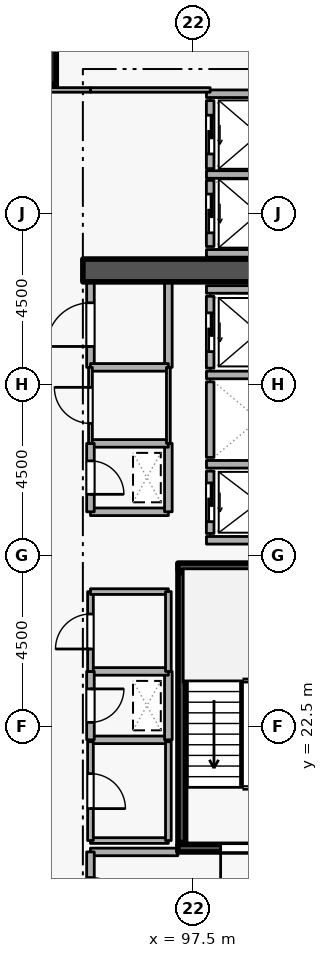
"""IFC4 building model, lengths in metres.
Left out: names, types, materials, properties, quantities, classifications, styles, units other than length and angle.
Written with IfcOpenShell. Run it as: python <this file> out.ifc"""

import sys

from ifc_helpers import new_model, si_unit, direction, frame, frame_2d, origin, origin_2d, place, context, subcontext, project, spatial, rectangle, extrude, element, fill, save


model = new_model("IFC4")
c1 = context("Model", 3, precision=1e-05, world=origin(), true_north=direction((0.0, 1.0)))
c2 = subcontext(c1, "Body", "Model", "MODEL_VIEW")
j1 = project(units=[si_unit("LENGTHUNIT", "METRE"), si_unit("PLANEANGLEUNIT", "RADIAN")], contexts=[c1])
p1 = place(None, origin())
s1 = spatial("IfcSite", under=j1, at=p1, CompositionType="ELEMENT")
p2 = place(p1, origin())
s2 = spatial("IfcBuilding", under=s1, at=p2, CompositionType="ELEMENT")
p3 = place(p2, frame((0.0, 0.0, 105.3)))
s3 = spatial("IfcBuildingStorey", under=s2, at=p3, CompositionType="ELEMENT", Elevation=105.3)
p4 = place(p3, frame((94.6, 34.5, 0.0), z_axis=(0.0, 0.0, 1.0), x_axis=(1.0, 0.0, 0.0)))
e1 = element("IfcWall", 1, at=p4, inside=s3, PredefinedType="SHEAR", context=c2, shape_type="SweptSolid", body=[
    extrude(rectangle(XDim=5.7, YDim=0.6, at=frame_2d((2.85, 0.0))), origin(), (0.0, 0.0, 1.0), 3.6),
])
p5 = place(p3, frame((93.3, 40.0, 0.0), z_axis=(0.0, 0.0, 1.0), x_axis=(1.0, 0.0, 0.0)))
e2 = element("IfcColumn", 2, at=p5, inside=s3, PredefinedType="COLUMN", context=c2, shape_type="SweptSolid", body=[
    extrude(rectangle(XDim=1.2, YDim=1.2, at=origin_2d()), origin(), (0.0, 0.0, 1.0), 3.6),
])
p6 = place(p3, frame((97.95, 29.22, 0.0), z_axis=(0.0, 0.0, 1.0), x_axis=(0.0, -1.0, 0.0)))
e3 = element("IfcWall", 3, at=p6, inside=s3, PredefinedType="STANDARD", context=c2, shape_type="SweptSolid", body=[
    extrude(rectangle(XDim=1.64, YDim=0.2, at=frame_2d((0.82, 0.0))), origin(), (0.0, 0.0, 1.0), 3.34),
])
p7 = place(p6, frame((0.31, 0.0, 0.0)))
e4 = element("IfcOpeningElement", 4, at=p7, cuts=e3, PredefinedType="OPENING", context=c2, shape_type="SweptSolid", body=[
    extrude(rectangle(XDim=1.02, YDim=2.06, at=frame_2d((0.51, 1.03))), frame((0.0, 0.11, 0.0), z_axis=(0.0, -1.0, 0.0), x_axis=(1.0, 0.0, 0.0)), (0.0, 0.0, 1.0), 0.22),
])
p8 = place(p3, frame((97.95, 31.57, 0.0), z_axis=(0.0, 0.0, 1.0), x_axis=(0.0, -1.0, 0.0)))
e5 = element("IfcWall", 5, at=p8, inside=s3, PredefinedType="STANDARD", context=c2, shape_type="SweptSolid", body=[
    extrude(rectangle(XDim=1.99, YDim=0.2, at=frame_2d((0.995, 0.0))), origin(), (0.0, 0.0, 1.0), 3.34),
])
p9 = place(p3, frame((97.95, 33.82, 0.0), z_axis=(0.0, 0.0, 1.0), x_axis=(0.0, -1.0, 0.0)))
e6 = element("IfcWall", 6, at=p9, inside=s3, PredefinedType="STANDARD", context=c2, shape_type="SweptSolid", body=[
    extrude(rectangle(XDim=1.89, YDim=0.2, at=frame_2d((0.945, 0.0))), origin(), (0.0, 0.0, 1.0), 3.34),
])
p10 = place(p9, frame((0.435, 0.0, 0.0)))
e7 = element("IfcOpeningElement", 7, at=p10, cuts=e6, PredefinedType="OPENING", context=c2, shape_type="SweptSolid", body=[
    extrude(rectangle(XDim=1.02, YDim=2.06, at=frame_2d((0.51, 1.03))), frame((0.0, 0.11, 0.0), z_axis=(0.0, -1.0, 0.0), x_axis=(1.0, 0.0, 0.0)), (0.0, 0.0, 1.0), 0.22),
])
p11 = place(p3, frame((97.95, 36.87, 0.0), z_axis=(0.0, 0.0, 1.0), x_axis=(0.0, -1.0, 0.0)))
e8 = element("IfcWall", 8, at=p11, inside=s3, PredefinedType="STANDARD", context=c2, shape_type="SweptSolid", body=[
    extrude(rectangle(XDim=1.74, YDim=0.2, at=frame_2d((0.87, 0.0))), origin(), (0.0, 0.0, 1.0), 3.34),
])
p12 = place(p11, frame((0.36, 0.0, 0.0)))
e9 = element("IfcOpeningElement", 9, at=p12, cuts=e8, PredefinedType="OPENING", context=c2, shape_type="SweptSolid", body=[
    extrude(rectangle(XDim=1.02, YDim=2.06, at=frame_2d((0.51, 1.03))), frame((0.0, 0.11, 0.0), z_axis=(0.0, -1.0, 0.0), x_axis=(1.0, 0.0, 0.0)), (0.0, 0.0, 1.0), 0.22),
])
p13 = place(p3, frame((97.95, 38.97, 0.0), z_axis=(0.0, 0.0, 1.0), x_axis=(0.0, -1.0, 0.0)))
e10 = element("IfcWall", 10, at=p13, inside=s3, PredefinedType="STANDARD", context=c2, shape_type="SweptSolid", body=[
    extrude(rectangle(XDim=1.79, YDim=0.2, at=frame_2d((0.895, 0.0))), origin(), (0.0, 0.0, 1.0), 3.34),
])
p14 = place(p13, frame((0.385, 0.0, 0.0)))
e11 = element("IfcOpeningElement", 11, at=p14, cuts=e10, PredefinedType="OPENING", context=c2, shape_type="SweptSolid", body=[
    extrude(rectangle(XDim=1.02, YDim=2.06, at=frame_2d((0.51, 1.03))), frame((0.0, 0.11, 0.0), z_axis=(0.0, -1.0, 0.0), x_axis=(1.0, 0.0, 0.0)), (0.0, 0.0, 1.0), 0.22),
])
for number, where, z_axis, x_axis in (
    (12, (97.852, 29.4, 0.0), (0.0, 0.0, 1.0), (1.0, 0.0, 0.0)),
    (13, (97.852, 27.4, 0.0), (0.0, 0.0, 1.0), (1.0, 0.0, 0.0)),
    (14, (97.852, 31.75, 0.0), (0.0, 0.0, 1.0), (1.0, 0.0, 0.0)),
    (15, (97.852, 34.0, 0.0), (0.0, 0.0, 1.0), (1.0, 0.0, 0.0)),
):
    element("IfcWall", number, at=place(p3, frame(where, z_axis=z_axis, x_axis=x_axis)), inside=s3, PredefinedType="STANDARD", context=c2, shape_type="SweptSolid", body=[
        extrude(rectangle(XDim=2.436, YDim=0.2, at=frame_2d((1.218, 0.0))), origin(), (0.0, 0.0, 1.0), 3.34),
    ])
for number, where, z_axis, x_axis in (
    (16, (97.852, 37.025, 0.0), (0.0, 0.0, 1.0), (1.0, 0.0, 0.0)),
    (17, (97.852, 34.95, 0.0), (0.0, 0.0, 1.0), (1.0, 0.0, 0.0)),
):
    element("IfcWall", number, at=place(p3, frame(where, z_axis=z_axis, x_axis=x_axis)), inside=s3, PredefinedType="STANDARD", context=c2, shape_type="SweptSolid", body=[
        extrude(rectangle(XDim=2.746, YDim=0.2, at=frame_2d((1.373, 0.0))), origin(), (0.0, 0.0, 1.0), 3.34),
    ])
p15 = place(p3, frame((97.852, 39.15, 0.0), z_axis=(0.0, 0.0, 1.0), x_axis=(1.0, 0.0, 0.0)))
e18 = element("IfcWall", 18, at=p15, inside=s3, PredefinedType="STANDARD", context=c2, shape_type="SweptSolid", body=[
    extrude(rectangle(XDim=2.636, YDim=0.2, at=frame_2d((1.318, 0.0))), origin(), (0.0, 0.0, 1.0), 3.34),
])
p16 = place(p3, frame((100.45, 19.3, 0.0), z_axis=(0.0, 0.0, 1.0), x_axis=(-1.0, 0.0, 0.0)))
e19 = element("IfcWall", 19, at=p16, inside=s3, PredefinedType="SHEAR", context=c2, shape_type="SweptSolid", body=[
    extrude(rectangle(XDim=3.35, YDim=0.2, at=frame_2d((1.675, 0.0))), origin(), (0.0, 0.0, 1.0), 3.6),
])
p17 = place(p16, frame((1.125, 0.0, 0.0)))
e20 = element("IfcOpeningElement", 20, at=p17, cuts=e19, PredefinedType="OPENING", context=c2, shape_type="SweptSolid", body=[
    extrude(rectangle(XDim=1.1, YDim=2.1, at=frame_2d((0.55, 1.05))), frame((0.0, 0.11, 0.0), z_axis=(0.0, -1.0, 0.0), x_axis=(1.0, 0.0, 0.0)), (0.0, 0.0, 1.0), 0.22),
])
p18 = place(p3, frame((97.1, 26.7, 0.0), z_axis=(0.0, 0.0, 1.0), x_axis=(1.0, 0.0, 0.0)))
e21 = element("IfcWall", 21, at=p18, inside=s3, PredefinedType="SHEAR", context=c2, shape_type="SweptSolid", body=[
    extrude(rectangle(XDim=3.35, YDim=0.2, at=frame_2d((1.675, 0.0))), origin(), (0.0, 0.0, 1.0), 3.6),
])
p19 = place(p3, frame((97.203, 26.55, 0.0), z_axis=(0.0, 0.0, 1.0), x_axis=(0.0, -1.0, 0.0)))
e22 = element("IfcWall", 22, at=p19, inside=s3, PredefinedType="SHEAR", context=c2, shape_type="SweptSolid", body=[
    extrude(rectangle(XDim=7.1, YDim=0.2, at=frame_2d((3.55, 0.0))), origin(), (0.0, 0.0, 1.0), 3.6),
])
p20 = place(p3, frame((97.1, 19.2, 0.0), z_axis=(0.0, 0.0, 1.0), x_axis=(-1.0, 0.0, 0.0)))
e23 = element("IfcWall", 23, at=p20, inside=s3, PredefinedType="STANDARD", context=c2, shape_type="SweptSolid", body=[
    extrude(rectangle(XDim=2.3, YDim=0.2, at=frame_2d((1.15, 0.0))), origin(), (0.0, 0.0, 1.0), 2.545),
])
p21 = place(p3, frame((94.8, 19.2, 0.0), z_axis=(0.0, 0.0, 1.0), x_axis=(0.0, -1.0, 0.0)))
e24 = element("IfcWall", 24, at=p21, inside=s3, PredefinedType="STANDARD", context=c2, shape_type="SweptSolid", body=[
    extrude(rectangle(XDim=2.5, YDim=0.2, at=frame_2d((1.25, 0.0))), origin(), (0.0, 0.0, 1.0), 3.34),
])
p22 = place(p21, frame((0.675, 0.0, 0.0)))
e25 = element("IfcOpeningElement", 25, at=p22, cuts=e24, PredefinedType="OPENING", context=c2, shape_type="SweptSolid", body=[
    extrude(rectangle(XDim=1.15, YDim=2.1, at=frame_2d((0.575, 1.05))), frame((0.0, 0.11, 0.0), z_axis=(0.0, -1.0, 0.0), x_axis=(1.0, 0.0, 0.0)), (0.0, 0.0, 1.0), 0.22),
])
p23 = place(p3, frame((94.8, 28.15, 0.0), z_axis=(0.0, 0.0, 1.0), x_axis=(1.0, 0.0, 0.0)))
e26 = element("IfcWall", 26, at=p23, inside=s3, PredefinedType="STANDARD", context=c2, shape_type="SweptSolid", body=[
    extrude(rectangle(XDim=2.05, YDim=0.2, at=frame_2d((1.025, 0.0))), origin(), (0.0, 0.0, 1.0), 3.34),
])
p24 = place(p3, frame((96.85, 28.15, 0.0), z_axis=(0.0, 0.0, 1.0), x_axis=(0.0, 1.0, 0.0)))
e27 = element("IfcWall", 27, at=p24, inside=s3, PredefinedType="STANDARD", context=c2, shape_type="SweptSolid", body=[
    extrude(rectangle(XDim=1.8, YDim=0.2, at=frame_2d((0.9, 0.0))), origin(), (0.0, 0.0, 1.0), 3.34),
])
p25 = place(p3, frame((96.85, 29.95, 0.0), z_axis=(0.0, 0.0, 1.0), x_axis=(-1.0, 0.0, 0.0)))
e28 = element("IfcWall", 28, at=p25, inside=s3, PredefinedType="STANDARD", context=c2, shape_type="SweptSolid", body=[
    extrude(rectangle(XDim=2.05, YDim=0.2, at=frame_2d((1.025, 0.0))), origin(), (0.0, 0.0, 1.0), 3.34),
])
p26 = place(p3, frame((94.8, 29.95, 0.0), z_axis=(0.0, 0.0, 1.0), x_axis=(0.0, -1.0, 0.0)))
e29 = element("IfcWall", 29, at=p26, inside=s3, PredefinedType="STANDARD", context=c2, shape_type="SweptSolid", body=[
    extrude(rectangle(XDim=1.8, YDim=0.2, at=frame_2d((0.9, 0.0))), origin(), (0.0, 0.0, 1.0), 3.34),
])
p27 = place(p26, frame((0.46, 0.0, 0.0)))
e30 = element("IfcOpeningElement", 30, at=p27, cuts=e29, PredefinedType="OPENING", context=c2, shape_type="SweptSolid", body=[
    extrude(rectangle(XDim=0.88, YDim=2.04, at=frame_2d((0.44, 1.02))), frame((0.0, 0.11, 0.0), z_axis=(0.0, -1.0, 0.0), x_axis=(1.0, 0.0, 0.0)), (0.0, 0.0, 1.0), 0.22),
])
p28 = place(p3, frame((94.8, 22.15, 0.0), z_axis=(0.0, 0.0, 1.0), x_axis=(1.0, 0.0, 0.0)))
e31 = element("IfcWall", 31, at=p28, inside=s3, PredefinedType="STANDARD", context=c2, shape_type="SweptSolid", body=[
    extrude(rectangle(XDim=2.05, YDim=0.2, at=frame_2d((1.025, 0.0))), origin(), (0.0, 0.0, 1.0), 3.34),
])
p29 = place(p3, frame((96.85, 22.15, 0.0), z_axis=(0.0, 0.0, 1.0), x_axis=(0.0, 1.0, 0.0)))
e32 = element("IfcWall", 32, at=p29, inside=s3, PredefinedType="STANDARD", context=c2, shape_type="SweptSolid", body=[
    extrude(rectangle(XDim=1.8, YDim=0.2, at=frame_2d((0.9, 0.0))), origin(), (0.0, 0.0, 1.0), 3.34),
])
p30 = place(p3, frame((96.85, 23.95, 0.0), z_axis=(0.0, 0.0, 1.0), x_axis=(-1.0, 0.0, 0.0)))
e33 = element("IfcWall", 33, at=p30, inside=s3, PredefinedType="STANDARD", context=c2, shape_type="SweptSolid", body=[
    extrude(rectangle(XDim=2.05, YDim=0.2, at=frame_2d((1.025, 0.0))), origin(), (0.0, 0.0, 1.0), 3.34),
])
p31 = place(p3, frame((94.8, 23.95, 0.0), z_axis=(0.0, 0.0, 1.0), x_axis=(0.0, -1.0, 0.0)))
e34 = element("IfcWall", 34, at=p31, inside=s3, PredefinedType="STANDARD", context=c2, shape_type="SweptSolid", body=[
    extrude(rectangle(XDim=1.8, YDim=0.2, at=frame_2d((0.9, 0.0))), origin(), (0.0, 0.0, 1.0), 3.34),
])
p32 = place(p31, frame((0.46, 0.0, 0.0)))
e35 = element("IfcOpeningElement", 35, at=p32, cuts=e34, PredefinedType="OPENING", context=c2, shape_type="SweptSolid", body=[
    extrude(rectangle(XDim=0.88, YDim=2.04, at=frame_2d((0.44, 1.02))), frame((0.0, 0.11, 0.0), z_axis=(0.0, -1.0, 0.0), x_axis=(1.0, 0.0, 0.0)), (0.0, 0.0, 1.0), 0.22),
])
p33 = place(p3, frame((94.8, 31.95, 0.0), z_axis=(0.0, 0.0, 1.0), x_axis=(0.0, 1.0, 0.0)))
e36 = element("IfcWall", 36, at=p33, inside=s3, PredefinedType="STANDARD", context=c2, shape_type="SweptSolid", body=[
    extrude(rectangle(XDim=2.25, YDim=0.2, at=frame_2d((1.125, 0.0))), origin(), (0.0, 0.0, 1.0), 3.34),
])
p34 = place(p33, frame((0.55, 0.0, 0.0)))
e37 = element("IfcOpeningElement", 37, at=p34, cuts=e36, PredefinedType="OPENING", context=c2, shape_type="SweptSolid", body=[
    extrude(rectangle(XDim=1.15, YDim=2.1, at=frame_2d((0.575, 1.05))), frame((0.0, 0.11, 0.0), z_axis=(0.0, -1.0, 0.0), x_axis=(1.0, 0.0, 0.0)), (0.0, 0.0, 1.0), 0.22),
])
p35 = place(p3, frame((96.85, 34.2, 0.0), z_axis=(0.0, 0.0, 1.0), x_axis=(0.0, -1.0, 0.0)))
e38 = element("IfcWall", 38, at=p35, inside=s3, PredefinedType="STANDARD", context=c2, shape_type="SweptSolid", body=[
    extrude(rectangle(XDim=2.25, YDim=0.2, at=frame_2d((1.125, 0.0))), origin(), (0.0, 0.0, 1.0), 3.34),
])
p36 = place(p3, frame((96.85, 31.95, 0.0), z_axis=(0.0, 0.0, 1.0), x_axis=(-1.0, 0.0, 0.0)))
e39 = element("IfcWall", 39, at=p36, inside=s3, PredefinedType="STANDARD", context=c2, shape_type="SweptSolid", body=[
    extrude(rectangle(XDim=2.05, YDim=0.2, at=frame_2d((1.025, 0.0))), origin(), (0.0, 0.0, 1.0), 3.34),
])
p37 = place(p3, frame((94.8, 19.5, 0.0), z_axis=(0.0, 0.0, 1.0), x_axis=(1.0, 0.0, 0.0)))
e40 = element("IfcWall", 40, at=p37, inside=s3, PredefinedType="PARTITIONING", context=c2, shape_type="SweptSolid", body=[
    extrude(rectangle(XDim=2.05, YDim=0.15, at=frame_2d((1.025, 0.0))), origin(), (0.0, 0.0, 1.0), 2.545),
])
p38 = place(p3, frame((96.85, 19.5, 0.0), z_axis=(0.0, 0.0, 1.0), x_axis=(0.0, 1.0, 0.0)))
e41 = element("IfcWall", 41, at=p38, inside=s3, PredefinedType="PARTITIONING", context=c2, shape_type="SweptSolid", body=[
    extrude(rectangle(XDim=2.6, YDim=0.15, at=frame_2d((1.3, 0.0))), origin(), (0.0, 0.0, 1.0), 3.34),
])
p39 = place(p3, frame((94.8, 22.1, 0.0), z_axis=(0.0, 0.0, 1.0), x_axis=(0.0, -1.0, 0.0)))
e42 = element("IfcWall", 42, at=p39, inside=s3, PredefinedType="PARTITIONING", context=c2, shape_type="SweptSolid", body=[
    extrude(rectangle(XDim=2.6, YDim=0.15, at=frame_2d((1.3, 0.0))), origin(), (0.0, 0.0, 1.0), 3.34),
])
p40 = place(p39, frame((0.84, 0.0, 0.0)))
e43 = element("IfcOpeningElement", 43, at=p40, cuts=e42, PredefinedType="OPENING", context=c2, shape_type="SweptSolid", body=[
    extrude(rectangle(XDim=0.92, YDim=2.08, at=frame_2d((0.46, 1.04))), frame((0.0, 0.085, 0.0), z_axis=(0.0, -1.0, 0.0), x_axis=(1.0, 0.0, 0.0)), (0.0, 0.0, 1.0), 0.17),
])
p41 = place(p3, frame((94.8, 23.95, 0.0), z_axis=(0.0, 0.0, 1.0), x_axis=(0.0, 1.0, 0.0)))
e44 = element("IfcWall", 44, at=p41, inside=s3, PredefinedType="PARTITIONING", context=c2, shape_type="SweptSolid", body=[
    extrude(rectangle(XDim=2.1, YDim=0.15, at=frame_2d((1.05, 0.0))), origin(), (0.0, 0.0, 1.0), 3.34),
])
p42 = place(p41, frame((0.59, 0.0, 0.0)))
e45 = element("IfcOpeningElement", 45, at=p42, cuts=e44, PredefinedType="OPENING", context=c2, shape_type="SweptSolid", body=[
    extrude(rectangle(XDim=0.92, YDim=2.08, at=frame_2d((0.46, 1.04))), frame((0.0, 0.085, 0.0), z_axis=(0.0, -1.0, 0.0), x_axis=(1.0, 0.0, 0.0)), (0.0, 0.0, 1.0), 0.17),
])
p43 = place(p3, frame((94.8, 26.05, 0.0), z_axis=(0.0, 0.0, 1.0), x_axis=(1.0, 0.0, 0.0)))
e46 = element("IfcWall", 46, at=p43, inside=s3, PredefinedType="PARTITIONING", context=c2, shape_type="SweptSolid", body=[
    extrude(rectangle(XDim=2.05, YDim=0.15, at=frame_2d((1.025, 0.0))), origin(), (0.0, 0.0, 1.0), 3.34),
])
p44 = place(p3, frame((96.85, 26.05, 0.0), z_axis=(0.0, 0.0, 1.0), x_axis=(0.0, -1.0, 0.0)))
e47 = element("IfcWall", 47, at=p44, inside=s3, PredefinedType="PARTITIONING", context=c2, shape_type="SweptSolid", body=[
    extrude(rectangle(XDim=2.1, YDim=0.15, at=frame_2d((1.05, 0.0))), origin(), (0.0, 0.0, 1.0), 3.34),
])
p45 = place(p3, frame((94.8, 29.95, 0.0), z_axis=(0.0, 0.0, 1.0), x_axis=(0.0, 1.0, 0.0)))
e48 = element("IfcWall", 48, at=p45, inside=s3, PredefinedType="PARTITIONING", context=c2, shape_type="SweptSolid", body=[
    extrude(rectangle(XDim=2.0, YDim=0.1, at=frame_2d((1.0, 0.0))), origin(), (0.0, 0.0, 1.0), 3.34),
])
p46 = place(p45, frame((0.525, 0.0, 0.0)))
e49 = element("IfcOpeningElement", 49, at=p46, cuts=e48, PredefinedType="OPENING", context=c2, shape_type="SweptSolid", body=[
    extrude(rectangle(XDim=0.95, YDim=2.1, at=frame_2d((0.475, 1.05))), frame((0.0, 0.06, 0.0), z_axis=(0.0, -1.0, 0.0), x_axis=(1.0, 0.0, 0.0)), (0.0, 0.0, 1.0), 0.12),
])
p47 = place(p3, frame((96.85, 31.95, 0.0), z_axis=(0.0, 0.0, 1.0), x_axis=(0.0, -1.0, 0.0)))
e50 = element("IfcWall", 50, at=p47, inside=s3, PredefinedType="PARTITIONING", context=c2, shape_type="SweptSolid", body=[
    extrude(rectangle(XDim=2.0, YDim=0.1, at=frame_2d((1.0, 0.0))), origin(), (0.0, 0.0, 1.0), 3.34),
])
p48 = place(p3, frame((97.95, 39.25, 0.0), z_axis=(0.0, 0.0, 1.0), x_axis=(-1.0, 0.0, 0.0)))
e51 = element("IfcWall", 51, at=p48, inside=s3, PredefinedType="PARTITIONING", context=c2, shape_type="SweptSolid", body=[
    extrude(rectangle(XDim=3.15, YDim=0.12, at=frame_2d((1.575, 0.0))), origin(), (0.0, 0.0, 1.0), 3.34),
])
p49 = place(p3, frame((94.8, 39.25, 0.0), z_axis=(0.0, 0.0, 1.0), x_axis=(-1.0, 0.0, 0.0)))
e52 = element("IfcWall", 52, at=p49, inside=s3, PredefinedType="PARTITIONING", context=c2, shape_type="SweptSolid", body=[
    extrude(rectangle(XDim=1.85, YDim=0.12, at=frame_2d((0.925, 0.0))), origin(), (0.0, 0.0, 1.0), 3.34),
])
p50 = place(p7, origin())
e53 = element("IfcDoor", 53, at=p50, inside=s3, OperationType="SLIDING_TO_LEFT", PredefinedType="DOOR", context=c2, shape_type="SweptSolid", body=[
    extrude(rectangle(XDim=1.02, YDim=2.06, at=frame_2d((0.51, 1.03))), frame((0.0, 0.025, 0.0), z_axis=(0.0, -1.0, 0.0), x_axis=(1.0, 0.0, 0.0)), (0.0, 0.0, 1.0), 0.05),
])
fill(e4, e53)
p51 = place(p10, origin())
e54 = element("IfcDoor", 54, at=p51, inside=s3, OperationType="SLIDING_TO_LEFT", PredefinedType="DOOR", context=c2, shape_type="SweptSolid", body=[
    extrude(rectangle(XDim=1.02, YDim=2.06, at=frame_2d((0.51, 1.03))), frame((0.0, 0.025, 0.0), z_axis=(0.0, -1.0, 0.0), x_axis=(1.0, 0.0, 0.0)), (0.0, 0.0, 1.0), 0.05),
])
fill(e7, e54)
p52 = place(p12, origin())
e55 = element("IfcDoor", 55, at=p52, inside=s3, OperationType="SLIDING_TO_LEFT", PredefinedType="DOOR", context=c2, shape_type="SweptSolid", body=[
    extrude(rectangle(XDim=1.02, YDim=2.06, at=frame_2d((0.51, 1.03))), frame((0.0, 0.025, 0.0), z_axis=(0.0, -1.0, 0.0), x_axis=(1.0, 0.0, 0.0)), (0.0, 0.0, 1.0), 0.05),
])
fill(e9, e55)
p53 = place(p14, origin())
e56 = element("IfcDoor", 56, at=p53, inside=s3, OperationType="SLIDING_TO_LEFT", PredefinedType="DOOR", context=c2, shape_type="SweptSolid", body=[
    extrude(rectangle(XDim=1.02, YDim=2.06, at=frame_2d((0.51, 1.03))), frame((0.0, 0.025, 0.0), z_axis=(0.0, -1.0, 0.0), x_axis=(1.0, 0.0, 0.0)), (0.0, 0.0, 1.0), 0.05),
])
fill(e11, e56)
p54 = place(p17, origin())
e57 = element("IfcDoor", 57, at=p54, inside=s3, OperationType="SINGLE_SWING_RIGHT", PredefinedType="DOOR", context=c2, shape_type="SweptSolid", body=[
    extrude(rectangle(XDim=1.1, YDim=2.1, at=frame_2d((0.55, 1.05))), frame((0.0, 0.025, 0.0), z_axis=(0.0, -1.0, 0.0), x_axis=(1.0, 0.0, 0.0)), (0.0, 0.0, 1.0), 0.05),
])
fill(e20, e57)
p55 = place(p22, origin())
e58 = element("IfcDoor", 58, at=p55, inside=s3, OperationType="SINGLE_SWING_RIGHT", PredefinedType="DOOR", context=c2, shape_type="SweptSolid", body=[
    extrude(rectangle(XDim=1.15, YDim=2.1, at=frame_2d((0.575, 1.05))), frame((0.0, 0.025, 0.0), z_axis=(0.0, -1.0, 0.0), x_axis=(1.0, 0.0, 0.0)), (0.0, 0.0, 1.0), 0.05),
])
fill(e25, e58)
p56 = place(p27, origin())
e59 = element("IfcDoor", 59, at=p56, inside=s3, OperationType="SINGLE_SWING_RIGHT", PredefinedType="DOOR", context=c2, shape_type="SweptSolid", body=[
    extrude(rectangle(XDim=0.88, YDim=2.04, at=frame_2d((0.44, 1.02))), frame((0.0, 0.025, 0.0), z_axis=(0.0, -1.0, 0.0), x_axis=(1.0, 0.0, 0.0)), (0.0, 0.0, 1.0), 0.05),
])
fill(e30, e59)
p57 = place(p32, origin())
e60 = element("IfcDoor", 60, at=p57, inside=s3, OperationType="SINGLE_SWING_LEFT", PredefinedType="DOOR", context=c2, shape_type="SweptSolid", body=[
    extrude(rectangle(XDim=0.88, YDim=2.04, at=frame_2d((0.44, 1.02))), frame((0.0, 0.025, 0.0), z_axis=(0.0, -1.0, 0.0), x_axis=(1.0, 0.0, 0.0)), (0.0, 0.0, 1.0), 0.05),
])
fill(e35, e60)
p58 = place(p40, origin())
e61 = element("IfcDoor", 61, at=p58, inside=s3, OperationType="SINGLE_SWING_RIGHT", PredefinedType="DOOR", context=c2, shape_type="SweptSolid", body=[
    extrude(rectangle(XDim=0.92, YDim=2.08, at=frame_2d((0.46, 1.04))), frame((0.0, 0.025, 0.0), z_axis=(0.0, -1.0, 0.0), x_axis=(1.0, 0.0, 0.0)), (0.0, 0.0, 1.0), 0.05),
])
fill(e43, e61)
p59 = place(p42, origin())
e62 = element("IfcDoor", 62, at=p59, inside=s3, OperationType="SINGLE_SWING_LEFT", PredefinedType="DOOR", context=c2, shape_type="SweptSolid", body=[
    extrude(rectangle(XDim=0.92, YDim=2.08, at=frame_2d((0.46, 1.04))), frame((0.0, 0.025, 0.0), z_axis=(0.0, -1.0, 0.0), x_axis=(1.0, 0.0, 0.0)), (0.0, 0.0, 1.0), 0.05),
])
fill(e45, e62)
p60 = place(p46, origin())
e63 = element("IfcDoor", 63, at=p60, inside=s3, OperationType="SINGLE_SWING_RIGHT", PredefinedType="DOOR", context=c2, shape_type="SweptSolid", body=[
    extrude(rectangle(XDim=0.95, YDim=2.1, at=frame_2d((0.475, 1.05))), frame((0.0, 0.025, 0.0), z_axis=(0.0, -1.0, 0.0), x_axis=(1.0, 0.0, 0.0)), (0.0, 0.0, 1.0), 0.05),
])
fill(e49, e63)
p61 = place(p34, origin())
e64 = element("IfcDoor", 64, at=p61, inside=s3, OperationType="SINGLE_SWING_LEFT", PredefinedType="DOOR", context=c2, shape_type="SweptSolid", body=[
    extrude(rectangle(XDim=1.15, YDim=2.1, at=frame_2d((0.575, 1.05))), frame((0.0, 0.025, 0.0), z_axis=(0.0, -1.0, 0.0), x_axis=(1.0, 0.0, 0.0)), (0.0, 0.0, 1.0), 0.05),
])
fill(e37, e64)
save(model, sys.argv[1])
